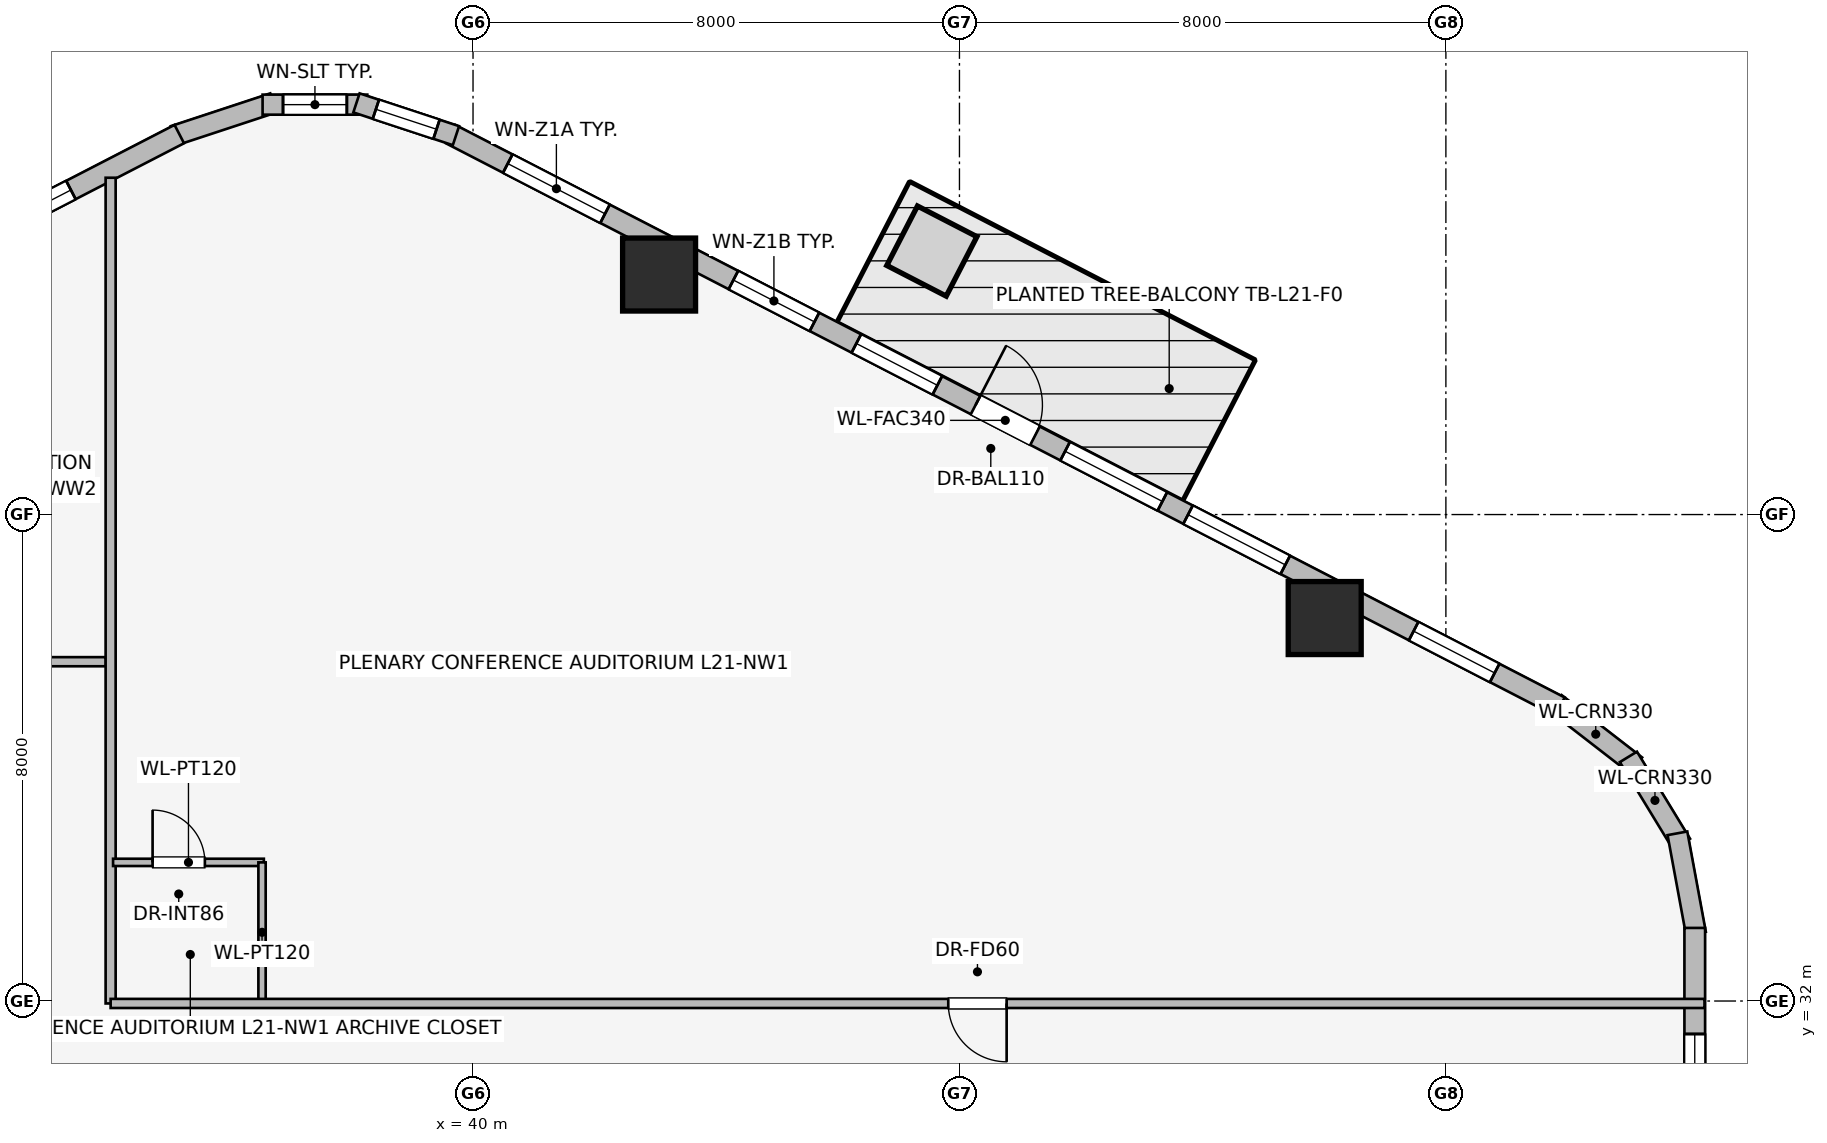
"""IFC4 building model, lengths in metres.
Left out: names, types, materials, properties, quantities, classifications, styles, units other than length and angle.
Written with IfcOpenShell. Run it as: python <this file> out.ifc"""

import sys

from ifc_helpers import new_model, si_unit, direction, frame, frame_2d, origin, origin_2d, place, context, subcontext, project, spatial, rectangle, extrude, element, fill, save


model = new_model("IFC4")
c1 = context("Model", 3, precision=1e-05, world=origin(), true_north=direction((0.0, 1.0)))
c2 = subcontext(c1, "Body", "Model", "MODEL_VIEW")
j1 = project(units=[si_unit("LENGTHUNIT", "METRE"), si_unit("PLANEANGLEUNIT", "RADIAN")], contexts=[c1])
p1 = place(None, origin())
s1 = spatial("IfcSite", under=j1, at=p1, CompositionType="ELEMENT")
p2 = place(p1, origin())
s2 = spatial("IfcBuilding", under=s1, at=p2, CompositionType="ELEMENT")
p3 = place(p2, frame((0.0, 0.0, 81.75)))
s3 = spatial("IfcBuildingStorey", under=s2, at=p3, CompositionType="ELEMENT", Elevation=81.75)
for number, where, z_axis, x_axis in (
    (1, (54.007, 38.298, 0.0), (0.0, 0.0, 1.0), (1.0, 0.0, 0.0)),
    (2, (43.06, 43.947, 0.0), (0.0, 0.0, 1.0), (1.0, 0.0, 0.0)),
):
    element("IfcColumn", number, at=place(p3, frame(where, z_axis=z_axis, x_axis=x_axis)), inside=s3, PredefinedType="COLUMN", context=c2, shape_type="SweptSolid", body=[
        extrude(rectangle(XDim=1.2, YDim=1.2, at=origin_2d()), origin(), (0.0, 0.0, 1.0), 3.65),
    ])
p4 = place(p3, frame((57.802, 36.901, 0.0), z_axis=(0.0, 0.0, 1.0), x_axis=(0.790691856293, -0.61221433207, 0.0)))
e3 = element("IfcWall", 3, at=p4, inside=s3, PredefinedType="STANDARD", context=c2, shape_type="SweptSolid", body=[
    extrude(rectangle(XDim=1.676, YDim=0.33, at=frame_2d((0.838, 0.0))), origin(), (0.0, 0.0, 1.0), 3.39),
])
p5 = place(p3, frame((59.002, 36.015, 0.0), z_axis=(0.0, 0.0, 1.0), x_axis=(0.520584129191, -0.853810379671, 0.0)))
e4 = element("IfcWall", 4, at=p5, inside=s3, PredefinedType="STANDARD", context=c2, shape_type="SweptSolid", body=[
    extrude(rectangle(XDim=1.677, YDim=0.33, at=frame_2d((0.838, 0.0))), origin(), (0.0, 0.0, 1.0), 3.39),
])
p6 = place(p3, frame((59.808, 34.758, 0.0), z_axis=(0.0, 0.0, 1.0), x_axis=(0.181714143354, -0.983351397063, 0.0)))
e5 = element("IfcWall", 5, at=p6, inside=s3, PredefinedType="STANDARD", context=c2, shape_type="SweptSolid", body=[
    extrude(rectangle(XDim=1.678, YDim=0.33, at=frame_2d((0.839, 0.0))), origin(), (0.0, 0.0, 1.0), 3.39),
])
p7 = place(p3, frame((39.631, 46.257, 0.0), z_axis=(0.0, 0.0, 1.0), x_axis=(0.888634413993, -0.458616264721, 0.0)))
e6 = element("IfcWall", 6, at=p7, inside=s3, PredefinedType="STANDARD", context=c2, shape_type="SweptSolid", body=[
    extrude(rectangle(XDim=20.531, YDim=0.34, at=frame_2d((10.266, 0.0))), origin(), (0.0, 0.0, 1.0), 2.684),
])
p8 = place(p7, frame((9.716, 0.0, 0.0)))
e7 = element("IfcOpeningElement", 7, at=p8, cuts=e6, PredefinedType="OPENING", context=c2, shape_type="SweptSolid", body=[
    extrude(rectangle(XDim=1.1, YDim=2.04, at=frame_2d((0.55, 1.02))), frame((0.0, 0.18, 0.0), z_axis=(0.0, -1.0, 0.0), x_axis=(1.0, 0.0, 0.0)), (0.0, 0.0, 1.0), 0.36),
])
p9 = place(p7, frame((1.058, 0.0, 0.75)))
e8 = element("IfcOpeningElement", 8, at=p9, cuts=e6, PredefinedType="OPENING", context=c2, shape_type="SweptSolid", body=[
    extrude(rectangle(XDim=1.8, YDim=1.5, at=frame_2d((0.9, 0.75))), frame((0.0, 0.18, 0.0), z_axis=(0.0, -1.0, 0.0), x_axis=(1.0, 0.0, 0.0)), (0.0, 0.0, 1.0), 0.36),
])
p10 = place(p7, frame((5.234, 0.0, 0.75)))
e9 = element("IfcOpeningElement", 9, at=p10, cuts=e6, PredefinedType="OPENING", context=c2, shape_type="SweptSolid", body=[
    extrude(rectangle(XDim=1.5, YDim=1.5, at=frame_2d((0.75, 0.75))), frame((0.0, 0.18, 0.0), z_axis=(0.0, -1.0, 0.0), x_axis=(1.0, 0.0, 0.0)), (0.0, 0.0, 1.0), 0.36),
])
p11 = place(p7, frame((7.509, 0.0, 0.75)))
e10 = element("IfcOpeningElement", 10, at=p11, cuts=e6, PredefinedType="OPENING", context=c2, shape_type="SweptSolid", body=[
    extrude(rectangle(XDim=1.5, YDim=1.5, at=frame_2d((0.75, 0.75))), frame((0.0, 0.18, 0.0), z_axis=(0.0, -1.0, 0.0), x_axis=(1.0, 0.0, 0.0)), (0.0, 0.0, 1.0), 0.36),
])
p12 = place(p7, frame((11.373, 0.0, 0.75)))
e11 = element("IfcOpeningElement", 11, at=p12, cuts=e6, PredefinedType="OPENING", context=c2, shape_type="SweptSolid", body=[
    extrude(rectangle(XDim=1.8, YDim=1.5, at=frame_2d((0.9, 0.75))), frame((0.0, 0.18, 0.0), z_axis=(0.0, -1.0, 0.0), x_axis=(1.0, 0.0, 0.0)), (0.0, 0.0, 1.0), 0.36),
])
p13 = place(p7, frame((13.648, 0.0, 0.75)))
e12 = element("IfcOpeningElement", 12, at=p13, cuts=e6, PredefinedType="OPENING", context=c2, shape_type="SweptSolid", body=[
    extrude(rectangle(XDim=1.8, YDim=1.5, at=frame_2d((0.9, 0.75))), frame((0.0, 0.18, 0.0), z_axis=(0.0, -1.0, 0.0), x_axis=(1.0, 0.0, 0.0)), (0.0, 0.0, 1.0), 0.36),
])
p14 = place(p7, frame((17.823, 0.0, 0.75)))
e13 = element("IfcOpeningElement", 13, at=p14, cuts=e6, PredefinedType="OPENING", context=c2, shape_type="SweptSolid", body=[
    extrude(rectangle(XDim=1.5, YDim=1.5, at=frame_2d((0.75, 0.75))), frame((0.0, 0.18, 0.0), z_axis=(0.0, -1.0, 0.0), x_axis=(1.0, 0.0, 0.0)), (0.0, 0.0, 1.0), 0.36),
])
p15 = place(p3, frame((35.081, 46.231, 0.0), z_axis=(0.0, 0.0, 1.0), x_axis=(0.94976901097, 0.312951794691, 0.0)))
e14 = element("IfcWall", 14, at=p15, inside=s3, PredefinedType="STANDARD", context=c2, shape_type="SweptSolid", body=[
    extrude(rectangle(XDim=1.722, YDim=0.33, at=frame_2d((0.861, 0.0))), origin(), (0.0, 0.0, 1.0), 3.39),
])
p16 = place(p3, frame((36.539, 46.741, 0.0), z_axis=(0.0, 0.0, 1.0), x_axis=(1.0, 0.0, 0.0)))
e15 = element("IfcWall", 15, at=p16, inside=s3, PredefinedType="STANDARD", context=c2, shape_type="SweptSolid", body=[
    extrude(rectangle(XDim=1.722, YDim=0.33, at=frame_2d((0.861, 0.0))), origin(), (0.0, 0.0, 1.0), 3.39),
])
p17 = place(p16, frame((0.336, 0.0, 0.75)))
e16 = element("IfcOpeningElement", 16, at=p17, cuts=e15, PredefinedType="OPENING", context=c2, shape_type="SweptSolid", body=[
    extrude(rectangle(XDim=1.05, YDim=1.4, at=frame_2d((0.525, 0.7))), frame((0.0, 0.175, 0.0), z_axis=(0.0, -1.0, 0.0), x_axis=(1.0, 0.0, 0.0)), (0.0, 0.0, 1.0), 0.35),
])
p18 = place(p3, frame((38.083, 46.77, 0.0), z_axis=(0.0, 0.0, 1.0), x_axis=(0.94976901097, -0.312951794691, 0.0)))
e17 = element("IfcWall", 17, at=p18, inside=s3, PredefinedType="STANDARD", context=c2, shape_type="SweptSolid", body=[
    extrude(rectangle(XDim=1.722, YDim=0.33, at=frame_2d((0.861, 0.0))), origin(), (0.0, 0.0, 1.0), 3.39),
])
p19 = place(p18, frame((0.336, 0.0, 0.75)))
e18 = element("IfcOpeningElement", 18, at=p19, cuts=e17, PredefinedType="OPENING", context=c2, shape_type="SweptSolid", body=[
    extrude(rectangle(XDim=1.05, YDim=1.4, at=frame_2d((0.525, 0.7))), frame((0.0, 0.175, 0.0), z_axis=(0.0, -1.0, 0.0), x_axis=(1.0, 0.0, 0.0)), (0.0, 0.0, 1.0), 0.35),
])
p20 = place(p3, frame((16.924, 36.841, 0.0), z_axis=(0.0, 0.0, 1.0), x_axis=(0.888634413993, 0.458616264721, 0.0)))
e19 = element("IfcWall", 19, at=p20, inside=s3, PredefinedType="STANDARD", context=c2, shape_type="SweptSolid", body=[
    extrude(rectangle(XDim=20.531, YDim=0.34, at=frame_2d((10.266, 0.0))), origin(), (0.0, 0.0, 1.0), 2.684),
])
p21 = place(p20, frame((5.197, 0.0, 0.75)))
e20 = element("IfcOpeningElement", 20, at=p21, cuts=e19, PredefinedType="OPENING", context=c2, shape_type="SweptSolid", body=[
    extrude(rectangle(XDim=1.8, YDim=1.5, at=frame_2d((0.9, 0.75))), frame((0.0, 0.18, 0.0), z_axis=(0.0, -1.0, 0.0), x_axis=(1.0, 0.0, 0.0)), (0.0, 0.0, 1.0), 0.36),
])
p22 = place(p20, frame((7.698, 0.0, 0.75)))
e21 = element("IfcOpeningElement", 21, at=p22, cuts=e19, PredefinedType="OPENING", context=c2, shape_type="SweptSolid", body=[
    extrude(rectangle(XDim=1.8, YDim=1.5, at=frame_2d((0.9, 0.75))), frame((0.0, 0.18, 0.0), z_axis=(0.0, -1.0, 0.0), x_axis=(1.0, 0.0, 0.0)), (0.0, 0.0, 1.0), 0.36),
])
p23 = place(p20, frame((11.101, 0.0, 0.75)))
e22 = element("IfcOpeningElement", 22, at=p23, cuts=e19, PredefinedType="OPENING", context=c2, shape_type="SweptSolid", body=[
    extrude(rectangle(XDim=1.5, YDim=1.5, at=frame_2d((0.75, 0.75))), frame((0.0, 0.18, 0.0), z_axis=(0.0, -1.0, 0.0), x_axis=(1.0, 0.0, 0.0)), (0.0, 0.0, 1.0), 0.36),
])
p24 = place(p20, frame((13.657, 0.0, 0.75)))
e23 = element("IfcOpeningElement", 23, at=p24, cuts=e19, PredefinedType="OPENING", context=c2, shape_type="SweptSolid", body=[
    extrude(rectangle(XDim=1.5, YDim=1.5, at=frame_2d((0.75, 0.75))), frame((0.0, 0.18, 0.0), z_axis=(0.0, -1.0, 0.0), x_axis=(1.0, 0.0, 0.0)), (0.0, 0.0, 1.0), 0.36),
])
p25 = place(p20, frame((17.476, 0.0, 0.75)))
e24 = element("IfcOpeningElement", 24, at=p25, cuts=e19, PredefinedType="OPENING", context=c2, shape_type="SweptSolid", body=[
    extrude(rectangle(XDim=1.05, YDim=1.4, at=frame_2d((0.525, 0.7))), frame((0.0, 0.18, 0.0), z_axis=(0.0, -1.0, 0.0), x_axis=(1.0, 0.0, 0.0)), (0.0, 0.0, 1.0), 0.36),
])
p26 = place(p3, frame((60.093, 33.202, 0.0), z_axis=(0.0, 0.0, 1.0), x_axis=(0.0, -1.0, 0.0)))
e25 = element("IfcWall", 25, at=p26, inside=s3, PredefinedType="STANDARD", context=c2, shape_type="SweptSolid", body=[
    extrude(rectangle(XDim=18.404, YDim=0.34, at=frame_2d((9.202, 0.0))), origin(), (0.0, 0.0, 1.0), 2.684),
])
p27 = place(p26, frame((1.744, 0.0, 0.75)))
e26 = element("IfcOpeningElement", 26, at=p27, cuts=e25, PredefinedType="OPENING", context=c2, shape_type="SweptSolid", body=[
    extrude(rectangle(XDim=1.05, YDim=1.4, at=frame_2d((0.525, 0.7))), frame((0.0, 0.18, 0.0), z_axis=(0.0, -1.0, 0.0), x_axis=(1.0, 0.0, 0.0)), (0.0, 0.0, 1.0), 0.36),
])
p28 = place(p26, frame((5.298, 0.0, 0.75)))
e27 = element("IfcOpeningElement", 27, at=p28, cuts=e25, PredefinedType="OPENING", context=c2, shape_type="SweptSolid", body=[
    extrude(rectangle(XDim=1.5, YDim=1.5, at=frame_2d((0.75, 0.75))), frame((0.0, 0.18, 0.0), z_axis=(0.0, -1.0, 0.0), x_axis=(1.0, 0.0, 0.0)), (0.0, 0.0, 1.0), 0.36),
])
p29 = place(p26, frame((8.793, 0.0, 0.75)))
e28 = element("IfcOpeningElement", 28, at=p29, cuts=e25, PredefinedType="OPENING", context=c2, shape_type="SweptSolid", body=[
    extrude(rectangle(XDim=1.05, YDim=1.4, at=frame_2d((0.525, 0.7))), frame((0.0, 0.18, 0.0), z_axis=(0.0, -1.0, 0.0), x_axis=(1.0, 0.0, 0.0)), (0.0, 0.0, 1.0), 0.36),
])
p30 = place(p26, frame((11.722, 0.0, 0.75)))
e29 = element("IfcOpeningElement", 29, at=p30, cuts=e25, PredefinedType="OPENING", context=c2, shape_type="SweptSolid", body=[
    extrude(rectangle(XDim=1.5, YDim=1.5, at=frame_2d((0.75, 0.75))), frame((0.0, 0.18, 0.0), z_axis=(0.0, -1.0, 0.0), x_axis=(1.0, 0.0, 0.0)), (0.0, 0.0, 1.0), 0.36),
])
p31 = place(p26, frame((15.65, 0.0, 0.75)))
e30 = element("IfcOpeningElement", 30, at=p31, cuts=e25, PredefinedType="OPENING", context=c2, shape_type="SweptSolid", body=[
    extrude(rectangle(XDim=1.05, YDim=1.4, at=frame_2d((0.525, 0.7))), frame((0.0, 0.18, 0.0), z_axis=(0.0, -1.0, 0.0), x_axis=(1.0, 0.0, 0.0)), (0.0, 0.0, 1.0), 0.36),
])
p32 = place(p3, frame((33.962, 37.58, 0.0), z_axis=(0.0, 0.0, 1.0), x_axis=(-1.0, 0.0, 0.0)))
e31 = element("IfcWall", 31, at=p32, inside=s3, PredefinedType="PARTITIONING", context=c2, shape_type="SweptSolid", body=[
    extrude(rectangle(XDim=7.904, YDim=0.15, at=frame_2d((3.952, 0.0))), origin(), (0.0, 0.0, 1.0), 3.39),
])
p33 = place(p32, frame((3.697, 0.0, 0.0)))
e32 = element("IfcOpeningElement", 32, at=p33, cuts=e31, PredefinedType="OPENING", context=c2, shape_type="SweptSolid", body=[
    extrude(rectangle(XDim=0.96, YDim=2.0, at=frame_2d((0.48, 1.0))), frame((0.0, 0.085, 0.0), z_axis=(0.0, -1.0, 0.0), x_axis=(1.0, 0.0, 0.0)), (0.0, 0.0, 1.0), 0.17),
])
p34 = place(p3, frame((34.04, 31.96, 0.0), z_axis=(0.0, 0.0, 1.0), x_axis=(0.0, 1.0, 0.0)))
e33 = element("IfcWall", 33, at=p34, inside=s3, PredefinedType="PARTITIONING", context=c2, shape_type="SweptSolid", body=[
    extrude(rectangle(XDim=13.579, YDim=0.165, at=frame_2d((6.79, 0.0))), origin(), (0.0, 0.0, 1.0), 3.39),
])
p35 = place(p3, frame((34.08, 34.28, 0.0), z_axis=(0.0, 0.0, 1.0), x_axis=(1.0, 0.0, 0.0)))
e34 = element("IfcWall", 34, at=p35, inside=s3, PredefinedType="PARTITIONING", context=c2, shape_type="SweptSolid", body=[
    extrude(rectangle(XDim=2.48, YDim=0.12, at=frame_2d((1.24, 0.0))), origin(), (0.0, 0.0, 1.0), 3.39),
])
p36 = place(p35, frame((0.65, 0.0, 0.0)))
e35 = element("IfcOpeningElement", 35, at=p36, cuts=e34, PredefinedType="OPENING", context=c2, shape_type="SweptSolid", body=[
    extrude(rectangle(XDim=0.86, YDim=2.0, at=frame_2d((0.43, 1.0))), frame((0.0, 0.07, 0.0), z_axis=(0.0, -1.0, 0.0), x_axis=(1.0, 0.0, 0.0)), (0.0, 0.0, 1.0), 0.14),
])
p37 = place(p3, frame((36.53, 31.98, 0.0), z_axis=(0.0, 0.0, 1.0), x_axis=(0.0, 1.0, 0.0)))
e36 = element("IfcWall", 36, at=p37, inside=s3, PredefinedType="PARTITIONING", context=c2, shape_type="SweptSolid", body=[
    extrude(rectangle(XDim=2.3, YDim=0.12, at=frame_2d((1.15, 0.0))), origin(), (0.0, 0.0, 1.0), 3.39),
])
p38 = place(p3, frame((60.253, 31.96, 0.0), z_axis=(0.0, 0.0, 1.0), x_axis=(-1.0, 0.0, 0.0)))
e37 = element("IfcWall", 37, at=p38, inside=s3, PredefinedType="PARTITIONING", context=c2, shape_type="SweptSolid", body=[
    extrude(rectangle(XDim=26.213, YDim=0.15, at=frame_2d((13.106, 0.0))), origin(), (0.0, 0.0, 1.0), 3.39),
])
p39 = place(p38, frame((11.477, 0.0, 0.0)))
e38 = element("IfcOpeningElement", 38, at=p39, cuts=e37, PredefinedType="OPENING", context=c2, shape_type="SweptSolid", body=[
    extrude(rectangle(XDim=0.96, YDim=2.0, at=frame_2d((0.48, 1.0))), frame((0.0, 0.085, 0.0), z_axis=(0.0, -1.0, 0.0), x_axis=(1.0, 0.0, 0.0)), (0.0, 0.0, 1.0), 0.17),
])
p40 = place(p8, origin())
e39 = element("IfcDoor", 39, at=p40, inside=s3, OperationType="SINGLE_SWING_LEFT", PredefinedType="DOOR", context=c2, shape_type="SweptSolid", body=[
    extrude(rectangle(XDim=1.1, YDim=2.04, at=frame_2d((0.55, 1.02))), frame((0.0, 0.025, 0.0), z_axis=(0.0, -1.0, 0.0), x_axis=(1.0, 0.0, 0.0)), (0.0, 0.0, 1.0), 0.05),
])
fill(e7, e39)
p41 = place(p9, origin())
e40 = element("IfcWindow", 40, at=p41, inside=s3, PartitioningType="SINGLE_PANEL", PredefinedType="WINDOW", context=c2, shape_type="SweptSolid", body=[
    extrude(rectangle(XDim=1.8, YDim=1.5, at=frame_2d((0.9, 0.75))), frame((0.0, 0.03, 0.0), z_axis=(0.0, -1.0, 0.0), x_axis=(1.0, 0.0, 0.0)), (0.0, 0.0, 1.0), 0.06),
])
fill(e8, e40)
p42 = place(p10, origin())
e41 = element("IfcWindow", 41, at=p42, inside=s3, PartitioningType="SINGLE_PANEL", PredefinedType="WINDOW", context=c2, shape_type="SweptSolid", body=[
    extrude(rectangle(XDim=1.5, YDim=1.5, at=frame_2d((0.75, 0.75))), frame((0.0, 0.03, 0.0), z_axis=(0.0, -1.0, 0.0), x_axis=(1.0, 0.0, 0.0)), (0.0, 0.0, 1.0), 0.06),
])
fill(e9, e41)
p43 = place(p11, origin())
e42 = element("IfcWindow", 42, at=p43, inside=s3, PartitioningType="SINGLE_PANEL", PredefinedType="WINDOW", context=c2, shape_type="SweptSolid", body=[
    extrude(rectangle(XDim=1.5, YDim=1.5, at=frame_2d((0.75, 0.75))), frame((0.0, 0.03, 0.0), z_axis=(0.0, -1.0, 0.0), x_axis=(1.0, 0.0, 0.0)), (0.0, 0.0, 1.0), 0.06),
])
fill(e10, e42)
p44 = place(p12, origin())
e43 = element("IfcWindow", 43, at=p44, inside=s3, PartitioningType="SINGLE_PANEL", PredefinedType="WINDOW", context=c2, shape_type="SweptSolid", body=[
    extrude(rectangle(XDim=1.8, YDim=1.5, at=frame_2d((0.9, 0.75))), frame((0.0, 0.03, 0.0), z_axis=(0.0, -1.0, 0.0), x_axis=(1.0, 0.0, 0.0)), (0.0, 0.0, 1.0), 0.06),
])
fill(e11, e43)
p45 = place(p13, origin())
e44 = element("IfcWindow", 44, at=p45, inside=s3, PartitioningType="SINGLE_PANEL", PredefinedType="WINDOW", context=c2, shape_type="SweptSolid", body=[
    extrude(rectangle(XDim=1.8, YDim=1.5, at=frame_2d((0.9, 0.75))), frame((0.0, 0.03, 0.0), z_axis=(0.0, -1.0, 0.0), x_axis=(1.0, 0.0, 0.0)), (0.0, 0.0, 1.0), 0.06),
])
fill(e12, e44)
p46 = place(p14, origin())
e45 = element("IfcWindow", 45, at=p46, inside=s3, PartitioningType="SINGLE_PANEL", PredefinedType="WINDOW", context=c2, shape_type="SweptSolid", body=[
    extrude(rectangle(XDim=1.5, YDim=1.5, at=frame_2d((0.75, 0.75))), frame((0.0, 0.03, 0.0), z_axis=(0.0, -1.0, 0.0), x_axis=(1.0, 0.0, 0.0)), (0.0, 0.0, 1.0), 0.06),
])
fill(e13, e45)
p47 = place(p17, origin())
e46 = element("IfcWindow", 46, at=p47, inside=s3, PartitioningType="SINGLE_PANEL", PredefinedType="WINDOW", context=c2, shape_type="SweptSolid", body=[
    extrude(rectangle(XDim=1.05, YDim=1.4, at=frame_2d((0.525, 0.7))), frame((0.0, 0.03, 0.0), z_axis=(0.0, -1.0, 0.0), x_axis=(1.0, 0.0, 0.0)), (0.0, 0.0, 1.0), 0.06),
])
fill(e16, e46)
p48 = place(p19, origin())
e47 = element("IfcWindow", 47, at=p48, inside=s3, PartitioningType="SINGLE_PANEL", PredefinedType="WINDOW", context=c2, shape_type="SweptSolid", body=[
    extrude(rectangle(XDim=1.05, YDim=1.4, at=frame_2d((0.525, 0.7))), frame((0.0, 0.03, 0.0), z_axis=(0.0, -1.0, 0.0), x_axis=(1.0, 0.0, 0.0)), (0.0, 0.0, 1.0), 0.06),
])
fill(e18, e47)
p49 = place(p25, origin())
e48 = element("IfcWindow", 48, at=p49, inside=s3, PartitioningType="SINGLE_PANEL", PredefinedType="WINDOW", context=c2, shape_type="SweptSolid", body=[
    extrude(rectangle(XDim=1.05, YDim=1.4, at=frame_2d((0.525, 0.7))), frame((0.0, 0.03, 0.0), z_axis=(0.0, -1.0, 0.0), x_axis=(1.0, 0.0, 0.0)), (0.0, 0.0, 1.0), 0.06),
])
fill(e24, e48)
p50 = place(p27, origin())
e49 = element("IfcWindow", 49, at=p50, inside=s3, PartitioningType="SINGLE_PANEL", PredefinedType="WINDOW", context=c2, shape_type="SweptSolid", body=[
    extrude(rectangle(XDim=1.05, YDim=1.4, at=frame_2d((0.525, 0.7))), frame((0.0, 0.03, 0.0), z_axis=(0.0, -1.0, 0.0), x_axis=(1.0, 0.0, 0.0)), (0.0, 0.0, 1.0), 0.06),
])
fill(e26, e49)
p51 = place(p36, origin())
e50 = element("IfcDoor", 50, at=p51, inside=s3, OperationType="SINGLE_SWING_LEFT", PredefinedType="DOOR", context=c2, shape_type="SweptSolid", body=[
    extrude(rectangle(XDim=0.86, YDim=2.0, at=frame_2d((0.43, 1.0))), frame((0.0, 0.025, 0.0), z_axis=(0.0, -1.0, 0.0), x_axis=(1.0, 0.0, 0.0)), (0.0, 0.0, 1.0), 0.05),
])
fill(e35, e50)
p52 = place(p39, origin())
e51 = element("IfcDoor", 51, at=p52, inside=s3, OperationType="SINGLE_SWING_LEFT", PredefinedType="DOOR", context=c2, shape_type="SweptSolid", body=[
    extrude(rectangle(XDim=0.96, YDim=2.0, at=frame_2d((0.48, 1.0))), frame((0.0, 0.025, 0.0), z_axis=(0.0, -1.0, 0.0), x_axis=(1.0, 0.0, 0.0)), (0.0, 0.0, 1.0), 0.05),
])
fill(e38, e51)
save(model, sys.argv[1])
